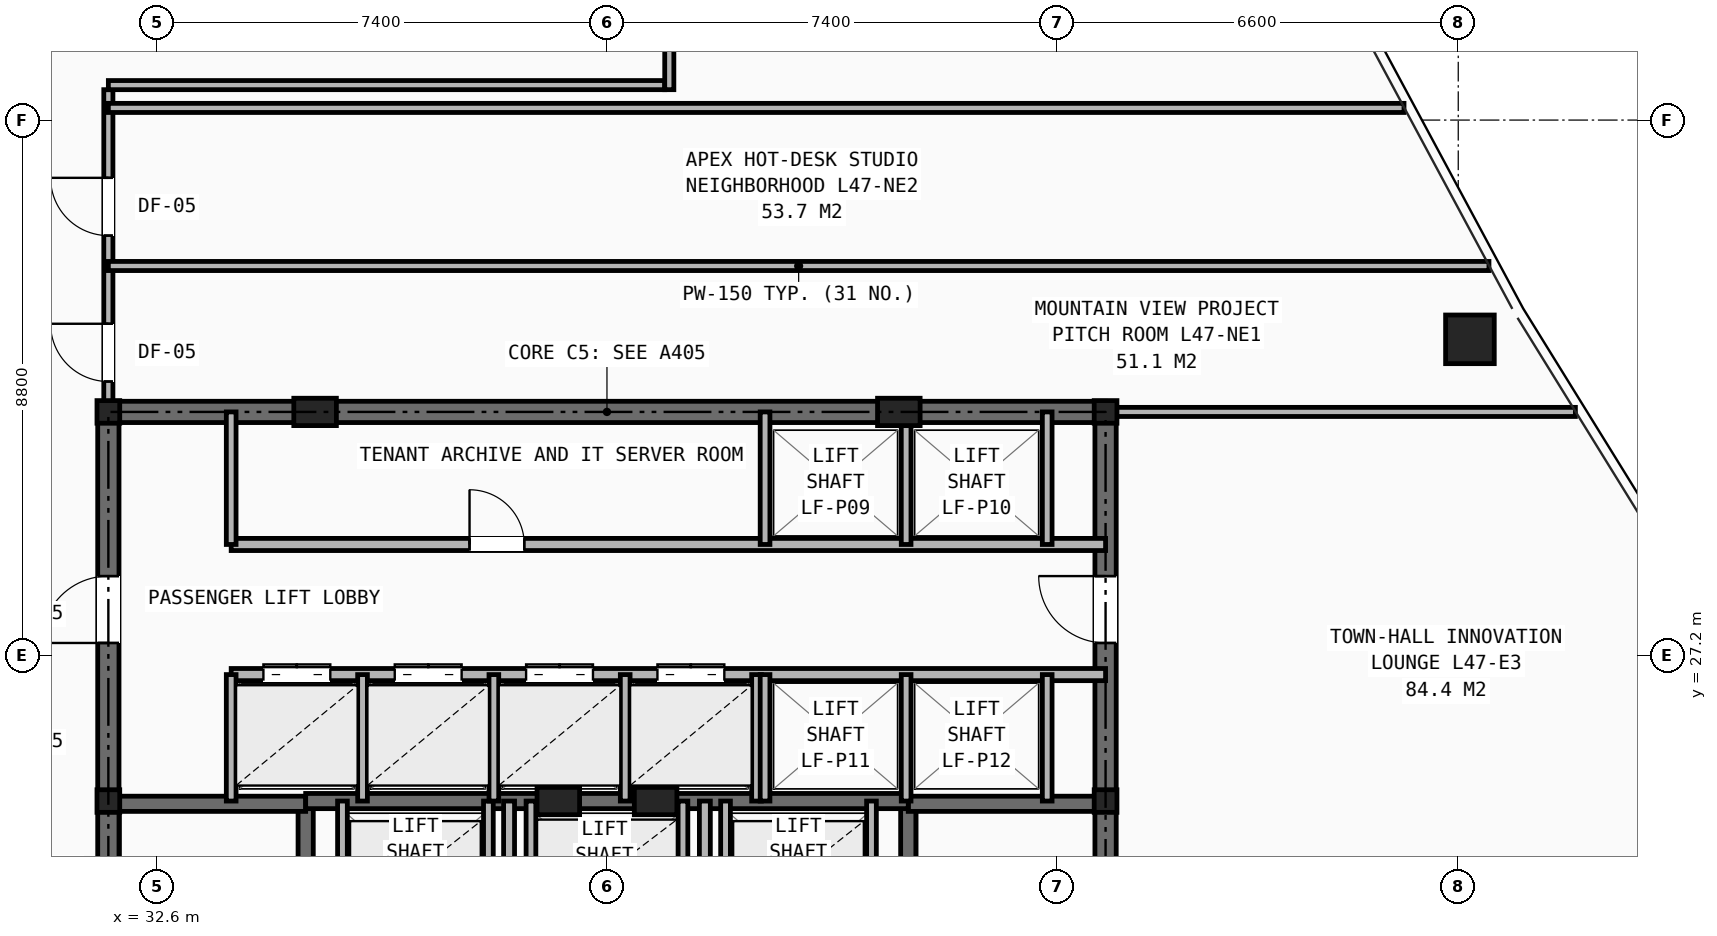
"""IFC4 building model, lengths in metres.
Left out: names, types, materials, properties, quantities, classifications, styles, units other than length and angle.
Written with IfcOpenShell. Run it as: python <this file> out.ifc"""

import sys

from ifc_helpers import new_model, si_unit, direction, frame, frame_2d, origin, origin_2d, place, context, subcontext, project, spatial, rectangle, hollow_rectangle, i_section, extrude, element, fill, save


model = new_model("IFC4")
c1 = context("Model", 3, precision=1e-05, world=origin(), true_north=direction((0.0, 1.0)))
c2 = subcontext(c1, "Body", "Model", "MODEL_VIEW")
j1 = project(units=[si_unit("LENGTHUNIT", "METRE"), si_unit("PLANEANGLEUNIT", "RADIAN")], contexts=[c1])
p1 = place(None, origin())
s1 = spatial("IfcSite", under=j1, at=p1, CompositionType="ELEMENT")
p2 = place(p1, origin())
s2 = spatial("IfcBuilding", under=s1, at=p2, CompositionType="ELEMENT")
p3 = place(p2, frame((0.0, 0.0, 165.45)))
s3 = spatial("IfcBuildingStorey", under=s2, at=p3, CompositionType="ELEMENT", Elevation=165.45)
for number, where, z_axis, x_axis in (
    (1, (31.8, 24.8, 0.0), (0.0, 0.0, 1.0), (1.0, 0.0, 0.0)),
    (2, (48.2, 24.8, 0.0), (0.0, 0.0, 1.0), (1.0, 0.0, 0.0)),
    (3, (31.8, 31.2, 0.0), (0.0, 0.0, 1.0), (1.0, 0.0, 0.0)),
    (4, (48.2, 31.2, 0.0), (0.0, 0.0, 1.0), (1.0, 0.0, 0.0)),
):
    element("IfcColumn", number, at=place(p3, frame(where, z_axis=z_axis, x_axis=x_axis)), inside=s3, PredefinedType="COLUMN", context=c2, shape_type="SweptSolid", body=[
        extrude(i_section(OverallWidth=0.374, OverallDepth=0.372, WebThickness=0.016, FlangeThickness=0.026, at=origin_2d()), origin(), (0.0, 0.0, 1.0), 3.45),
    ])
for number, where, z_axis, x_axis in (
    (5, (35.2, 31.2, 0.0), (0.0, 0.0, 1.0), (1.0, 0.0, 0.0)),
    (6, (44.8, 31.2, 0.0), (0.0, 0.0, 1.0), (1.0, 0.0, 0.0)),
    (7, (39.2, 24.8, 0.0), (0.0, 0.0, 1.0), (1.0, 0.0, 0.0)),
    (8, (40.8, 24.8, 0.0), (0.0, 0.0, 1.0), (1.0, 0.0, 0.0)),
):
    element("IfcColumn", number, at=place(p3, frame(where, z_axis=z_axis, x_axis=x_axis)), inside=s3, PredefinedType="PILASTER", context=c2, shape_type="SweptSolid", body=[
        extrude(rectangle(XDim=0.7, YDim=0.45, at=origin_2d()), origin(), (0.0, 0.0, 1.0), 3.45),
    ])
p4 = place(p3, frame((54.192, 32.394, 0.0), z_axis=(0.0, 0.0, 1.0), x_axis=(1.0, 0.0, 0.0)))
e9 = element("IfcColumn", 9, at=p4, inside=s3, PredefinedType="COLUMN", context=c2, shape_type="SweptSolid", body=[
    extrude(hollow_rectangle(XDim=0.8, YDim=0.8, WallThickness=0.055, at=origin_2d()), origin(), (0.0, 0.0, 1.0), 3.45),
])
p5 = place(p3, frame((31.8, 31.2, 0.0), z_axis=(0.0, 0.0, 1.0), x_axis=(1.0, 0.0, 0.0)))
e10 = element("IfcWall", 10, at=p5, inside=s3, PredefinedType="SHEAR", context=c2, shape_type="SweptSolid", body=[
    extrude(rectangle(XDim=16.4, YDim=0.35, at=frame_2d((8.2, 0.0))), origin(), (0.0, 0.0, 1.0), 3.21),
])
p6 = place(p3, frame((31.8, 16.4, 0.0), z_axis=(0.0, 0.0, 1.0), x_axis=(0.0, 1.0, 0.0)))
e11 = element("IfcWall", 11, at=p6, inside=s3, PredefinedType="SHEAR", context=c2, shape_type="SweptSolid", body=[
    extrude(rectangle(XDim=14.8, YDim=0.35, at=frame_2d((7.4, 0.0))), origin(), (0.0, 0.0, 1.0), 3.21),
])
p7 = place(p6, frame((11.0, 0.0, 0.0)))
e12 = element("IfcOpeningElement", 12, at=p7, cuts=e11, PredefinedType="OPENING", context=c2, shape_type="SweptSolid", body=[
    extrude(rectangle(XDim=1.1, YDim=2.15, at=frame_2d((0.55, 1.075))), frame((0.0, 0.185, 0.0), z_axis=(0.0, -1.0, 0.0), x_axis=(1.0, 0.0, 0.0)), (0.0, 0.0, 1.0), 0.37),
])
p8 = place(p3, frame((48.2, 16.4, 0.0), z_axis=(0.0, 0.0, 1.0), x_axis=(0.0, 1.0, 0.0)))
e13 = element("IfcWall", 13, at=p8, inside=s3, PredefinedType="SHEAR", context=c2, shape_type="SweptSolid", body=[
    extrude(rectangle(XDim=14.8, YDim=0.35, at=frame_2d((7.4, 0.0))), origin(), (0.0, 0.0, 1.0), 3.21),
])
p9 = place(p8, frame((11.0, 0.0, 0.0)))
e14 = element("IfcOpeningElement", 14, at=p9, cuts=e13, PredefinedType="OPENING", context=c2, shape_type="SweptSolid", body=[
    extrude(rectangle(XDim=1.1, YDim=2.15, at=frame_2d((0.55, 1.075))), frame((0.0, 0.185, 0.0), z_axis=(0.0, -1.0, 0.0), x_axis=(1.0, 0.0, 0.0)), (0.0, 0.0, 1.0), 0.37),
])
p10 = place(p3, frame((35.045, 16.4, 0.0), z_axis=(0.0, 0.0, 1.0), x_axis=(0.0, 1.0, 0.0)))
e15 = element("IfcWall", 15, at=p10, inside=s3, PredefinedType="SHEAR", context=c2, shape_type="SweptSolid", body=[
    extrude(rectangle(XDim=8.4, YDim=0.25, at=frame_2d((4.2, 0.0))), origin(), (0.0, 0.0, 1.0), 3.21),
])
p11 = place(p10, frame((0.45, 0.0, 0.0)))
e16 = element("IfcOpeningElement", 16, at=p11, cuts=e15, PredefinedType="OPENING", context=c2, shape_type="SweptSolid", body=[
    extrude(rectangle(XDim=0.95, YDim=2.1, at=frame_2d((0.475, 1.05))), frame((0.0, 0.135, 0.0), z_axis=(0.0, -1.0, 0.0), x_axis=(1.0, 0.0, 0.0)), (0.0, 0.0, 1.0), 0.27),
])
p12 = place(p3, frame((31.8, 24.755, 0.0), z_axis=(0.0, 0.0, 1.0), x_axis=(1.0, 0.0, 0.0)))
e17 = element("IfcWall", 17, at=p12, inside=s3, PredefinedType="SHEAR", context=c2, shape_type="SweptSolid", body=[
    extrude(rectangle(XDim=3.245, YDim=0.25, at=frame_2d((1.623, 0.0))), origin(), (0.0, 0.0, 1.0), 3.21),
])
p13 = place(p3, frame((44.955, 16.4, 0.0), z_axis=(0.0, 0.0, 1.0), x_axis=(0.0, 1.0, 0.0)))
e18 = element("IfcWall", 18, at=p13, inside=s3, PredefinedType="SHEAR", context=c2, shape_type="SweptSolid", body=[
    extrude(rectangle(XDim=8.4, YDim=0.25, at=frame_2d((4.2, 0.0))), origin(), (0.0, 0.0, 1.0), 3.21),
])
p14 = place(p13, frame((0.45, 0.0, 0.0)))
e19 = element("IfcOpeningElement", 19, at=p14, cuts=e18, PredefinedType="OPENING", context=c2, shape_type="SweptSolid", body=[
    extrude(rectangle(XDim=0.95, YDim=2.1, at=frame_2d((0.475, 1.05))), frame((0.0, 0.135, 0.0), z_axis=(0.0, -1.0, 0.0), x_axis=(1.0, 0.0, 0.0)), (0.0, 0.0, 1.0), 0.27),
])
p15 = place(p3, frame((44.955, 24.755, 0.0), z_axis=(0.0, 0.0, 1.0), x_axis=(1.0, 0.0, 0.0)))
e20 = element("IfcWall", 20, at=p15, inside=s3, PredefinedType="SHEAR", context=c2, shape_type="SweptSolid", body=[
    extrude(rectangle(XDim=3.245, YDim=0.25, at=frame_2d((1.623, 0.0))), origin(), (0.0, 0.0, 1.0), 3.21),
])
p16 = place(p3, frame((35.045, 24.8, 0.0), z_axis=(0.0, 0.0, 1.0), x_axis=(1.0, 0.0, 0.0)))
e21 = element("IfcWall", 21, at=p16, inside=s3, PredefinedType="SHEAR", context=c2, shape_type="SweptSolid", body=[
    extrude(rectangle(XDim=9.91, YDim=0.25, at=frame_2d((4.955, 0.0))), origin(), (0.0, 0.0, 1.0), 3.21),
])
p17 = place(p3, frame((38.39, 16.4, 0.0), z_axis=(0.0, 0.0, 1.0), x_axis=(0.0, 1.0, 0.0)))
e22 = element("IfcWall", 22, at=p17, inside=s3, PredefinedType="PARTITIONING", context=c2, shape_type="SweptSolid", body=[
    extrude(rectangle(XDim=8.4, YDim=0.18, at=frame_2d((4.2, 0.0))), origin(), (0.0, 0.0, 1.0), 2.665),
])
p18 = place(p17, frame((1.8, 0.0, 0.0)))
e23 = element("IfcOpeningElement", 23, at=p18, cuts=e22, PredefinedType="OPENING", context=c2, shape_type="SweptSolid", body=[
    extrude(rectangle(XDim=0.85, YDim=2.05, at=frame_2d((0.425, 1.025))), frame((0.0, 0.1, 0.0), z_axis=(0.0, -1.0, 0.0), x_axis=(1.0, 0.0, 0.0)), (0.0, 0.0, 1.0), 0.2),
])
p19 = place(p17, frame((4.35, 0.0, 0.0)))
e24 = element("IfcOpeningElement", 24, at=p19, cuts=e22, PredefinedType="OPENING", context=c2, shape_type="SweptSolid", body=[
    extrude(rectangle(XDim=0.95, YDim=2.1, at=frame_2d((0.475, 1.05))), frame((0.0, 0.1, 0.0), z_axis=(0.0, -1.0, 0.0), x_axis=(1.0, 0.0, 0.0)), (0.0, 0.0, 1.0), 0.2),
])
p20 = place(p3, frame((41.61, 16.4, 0.0), z_axis=(0.0, 0.0, 1.0), x_axis=(0.0, 1.0, 0.0)))
e25 = element("IfcWall", 25, at=p20, inside=s3, PredefinedType="PARTITIONING", context=c2, shape_type="SweptSolid", body=[
    extrude(rectangle(XDim=8.4, YDim=0.18, at=frame_2d((4.2, 0.0))), origin(), (0.0, 0.0, 1.0), 2.665),
])
p21 = place(p20, frame((1.8, 0.0, 0.0)))
e26 = element("IfcOpeningElement", 26, at=p21, cuts=e25, PredefinedType="OPENING", context=c2, shape_type="SweptSolid", body=[
    extrude(rectangle(XDim=0.85, YDim=2.05, at=frame_2d((0.425, 1.025))), frame((0.0, 0.1, 0.0), z_axis=(0.0, -1.0, 0.0), x_axis=(1.0, 0.0, 0.0)), (0.0, 0.0, 1.0), 0.2),
])
for number, where, z_axis, x_axis in (
    (27, (35.65, 22.48, 0.0), (0.0, 0.0, 1.0), (0.0, 1.0, 0.0)),
    (28, (38.05, 22.48, 0.0), (0.0, 0.0, 1.0), (0.0, 1.0, 0.0)),
    (29, (41.95, 22.48, 0.0), (0.0, 0.0, 1.0), (0.0, 1.0, 0.0)),
    (30, (44.35, 22.48, 0.0), (0.0, 0.0, 1.0), (0.0, 1.0, 0.0)),
    (31, (38.75, 22.48, 0.0), (0.0, 0.0, 1.0), (0.0, 1.0, 0.0)),
    (32, (41.25, 22.48, 0.0), (0.0, 0.0, 1.0), (0.0, 1.0, 0.0)),
):
    element("IfcWall", number, at=place(p3, frame(where, z_axis=z_axis, x_axis=x_axis)), inside=s3, PredefinedType="SOLIDWALL", context=c2, shape_type="SweptSolid", body=[
        extrude(rectangle(XDim=2.32, YDim=0.16, at=frame_2d((1.16, 0.0))), origin(), (0.0, 0.0, 1.0), 3.21),
    ])
p22 = place(p3, frame((33.82, 29.02, 0.0), z_axis=(0.0, 0.0, 1.0), x_axis=(1.0, 0.0, 0.0)))
e33 = element("IfcWall", 33, at=p22, inside=s3, PredefinedType="SOLIDWALL", context=c2, shape_type="SweptSolid", body=[
    extrude(rectangle(XDim=14.38, YDim=0.2, at=frame_2d((7.19, 0.0))), origin(), (0.0, 0.0, 1.0), 2.665),
])
p23 = place(p22, frame((3.92, 0.0, 0.0)))
e34 = element("IfcOpeningElement", 34, at=p23, cuts=e33, PredefinedType="OPENING", context=c2, shape_type="SweptSolid", body=[
    extrude(rectangle(XDim=0.9, YDim=2.1, at=frame_2d((0.45, 1.05))), frame((0.0, 0.11, 0.0), z_axis=(0.0, -1.0, 0.0), x_axis=(1.0, 0.0, 0.0)), (0.0, 0.0, 1.0), 0.22),
])
p24 = place(p3, frame((33.82, 26.88, 0.0), z_axis=(0.0, 0.0, 1.0), x_axis=(1.0, 0.0, 0.0)))
e35 = element("IfcWall", 35, at=p24, inside=s3, PredefinedType="SOLIDWALL", context=c2, shape_type="SweptSolid", body=[
    extrude(rectangle(XDim=14.38, YDim=0.2, at=frame_2d((7.19, 0.0))), origin(), (0.0, 0.0, 1.0), 2.665),
])
p25 = place(p24, frame((0.53, 0.0, 0.0)))
e36 = element("IfcOpeningElement", 36, at=p25, cuts=e35, PredefinedType="OPENING", context=c2, shape_type="SweptSolid", body=[
    extrude(rectangle(XDim=1.1, YDim=2.15, at=frame_2d((0.55, 1.075))), frame((0.0, 0.11, 0.0), z_axis=(0.0, -1.0, 0.0), x_axis=(1.0, 0.0, 0.0)), (0.0, 0.0, 1.0), 0.22),
])
p26 = place(p24, frame((2.69, 0.0, 0.0)))
e37 = element("IfcOpeningElement", 37, at=p26, cuts=e35, PredefinedType="OPENING", context=c2, shape_type="SweptSolid", body=[
    extrude(rectangle(XDim=1.1, YDim=2.15, at=frame_2d((0.55, 1.075))), frame((0.0, 0.11, 0.0), z_axis=(0.0, -1.0, 0.0), x_axis=(1.0, 0.0, 0.0)), (0.0, 0.0, 1.0), 0.22),
])
p27 = place(p24, frame((4.85, 0.0, 0.0)))
e38 = element("IfcOpeningElement", 38, at=p27, cuts=e35, PredefinedType="OPENING", context=c2, shape_type="SweptSolid", body=[
    extrude(rectangle(XDim=1.1, YDim=2.15, at=frame_2d((0.55, 1.075))), frame((0.0, 0.11, 0.0), z_axis=(0.0, -1.0, 0.0), x_axis=(1.0, 0.0, 0.0)), (0.0, 0.0, 1.0), 0.22),
])
p28 = place(p24, frame((7.01, 0.0, 0.0)))
e39 = element("IfcOpeningElement", 39, at=p28, cuts=e35, PredefinedType="OPENING", context=c2, shape_type="SweptSolid", body=[
    extrude(rectangle(XDim=1.1, YDim=2.15, at=frame_2d((0.55, 1.075))), frame((0.0, 0.11, 0.0), z_axis=(0.0, -1.0, 0.0), x_axis=(1.0, 0.0, 0.0)), (0.0, 0.0, 1.0), 0.22),
])
p29 = place(p3, frame((33.82, 29.02, 0.0), z_axis=(0.0, 0.0, 1.0), x_axis=(0.0, 1.0, 0.0)))
e40 = element("IfcWall", 40, at=p29, inside=s3, PredefinedType="SOLIDWALL", context=c2, shape_type="SweptSolid", body=[
    extrude(rectangle(XDim=2.18, YDim=0.16, at=frame_2d((1.09, 0.0))), origin(), (0.0, 0.0, 1.0), 2.665),
])
for number, where, z_axis, x_axis in (
    (41, (33.82, 24.8, 0.0), (0.0, 0.0, 1.0), (0.0, 1.0, 0.0)),
    (42, (35.98, 24.8, 0.0), (0.0, 0.0, 1.0), (0.0, 1.0, 0.0)),
    (43, (38.14, 24.8, 0.0), (0.0, 0.0, 1.0), (0.0, 1.0, 0.0)),
    (44, (40.3, 24.8, 0.0), (0.0, 0.0, 1.0), (0.0, 1.0, 0.0)),
    (45, (42.46, 24.8, 0.0), (0.0, 0.0, 1.0), (0.0, 1.0, 0.0)),
):
    element("IfcWall", number, at=place(p3, frame(where, z_axis=z_axis, x_axis=x_axis)), inside=s3, PredefinedType="SOLIDWALL", context=c2, shape_type="SweptSolid", body=[
        extrude(rectangle(XDim=2.08, YDim=0.16, at=frame_2d((1.04, 0.0))), origin(), (0.0, 0.0, 1.0), 3.21),
    ])
for number, where, z_axis, x_axis in (
    (46, (42.6, 29.02, 0.0), (0.0, 0.0, 1.0), (0.0, 1.0, 0.0)),
    (47, (44.92, 29.02, 0.0), (0.0, 0.0, 1.0), (0.0, 1.0, 0.0)),
    (48, (47.24, 29.02, 0.0), (0.0, 0.0, 1.0), (0.0, 1.0, 0.0)),
):
    element("IfcWall", number, at=place(p3, frame(where, z_axis=z_axis, x_axis=x_axis)), inside=s3, PredefinedType="SOLIDWALL", context=c2, shape_type="SweptSolid", body=[
        extrude(rectangle(XDim=2.18, YDim=0.16, at=frame_2d((1.09, 0.0))), origin(), (0.0, 0.0, 1.0), 2.665),
    ])
for number, where, z_axis, x_axis in (
    (49, (42.6, 24.8, 0.0), (0.0, 0.0, 1.0), (0.0, 1.0, 0.0)),
    (50, (44.92, 24.8, 0.0), (0.0, 0.0, 1.0), (0.0, 1.0, 0.0)),
    (51, (47.24, 24.8, 0.0), (0.0, 0.0, 1.0), (0.0, 1.0, 0.0)),
):
    element("IfcWall", number, at=place(p3, frame(where, z_axis=z_axis, x_axis=x_axis)), inside=s3, PredefinedType="SOLIDWALL", context=c2, shape_type="SweptSolid", body=[
        extrude(rectangle(XDim=2.08, YDim=0.16, at=frame_2d((1.04, 0.0))), origin(), (0.0, 0.0, 1.0), 3.21),
    ])
p30 = place(p3, frame((31.8, 31.2, 0.0), z_axis=(0.0, 0.0, 1.0), x_axis=(0.0, 1.0, 0.0)))
e52 = element("IfcWall", 52, at=p30, inside=s3, PredefinedType="PARTITIONING", context=c2, shape_type="SweptSolid", body=[
    extrude(rectangle(XDim=5.3, YDim=0.15, at=frame_2d((2.65, 0.0))), origin(), (0.0, 0.0, 1.0), 2.252),
])
p31 = place(p30, frame((0.5, 0.0, 0.0)))
e53 = element("IfcOpeningElement", 53, at=p31, cuts=e52, PredefinedType="OPENING", context=c2, shape_type="SweptSolid", body=[
    extrude(rectangle(XDim=0.95, YDim=2.1, at=frame_2d((0.475, 1.05))), frame((0.0, 0.085, 0.0), z_axis=(0.0, -1.0, 0.0), x_axis=(1.0, 0.0, 0.0)), (0.0, 0.0, 1.0), 0.17),
])
p32 = place(p30, frame((2.9, 0.0, 0.0)))
e54 = element("IfcOpeningElement", 54, at=p32, cuts=e52, PredefinedType="OPENING", context=c2, shape_type="SweptSolid", body=[
    extrude(rectangle(XDim=0.95, YDim=2.1, at=frame_2d((0.475, 1.05))), frame((0.0, 0.085, 0.0), z_axis=(0.0, -1.0, 0.0), x_axis=(1.0, 0.0, 0.0)), (0.0, 0.0, 1.0), 0.17),
])
p33 = place(p3, frame((48.2, 31.2, 0.0), z_axis=(0.0, 0.0, 1.0), x_axis=(1.0, 0.0, 0.0)))
e55 = element("IfcWall", 55, at=p33, inside=s3, PredefinedType="PARTITIONING", context=c2, shape_type="SweptSolid", body=[
    extrude(rectangle(XDim=7.727, YDim=0.15, at=frame_2d((3.863, 0.0))), origin(), (0.0, 0.0, 1.0), 2.252),
])
p34 = place(p3, frame((31.8, 33.6, 0.0), z_axis=(0.0, 0.0, 1.0), x_axis=(1.0, 0.0, 0.0)))
e56 = element("IfcWall", 56, at=p34, inside=s3, PredefinedType="PARTITIONING", context=c2, shape_type="SweptSolid", body=[
    extrude(rectangle(XDim=22.705, YDim=0.15, at=frame_2d((11.353, 0.0))), origin(), (0.0, 0.0, 1.0), 2.589),
])
p35 = place(p3, frame((31.8, 36.2, 0.0), z_axis=(0.0, 0.0, 1.0), x_axis=(1.0, 0.0, 0.0)))
e57 = element("IfcWall", 57, at=p35, inside=s3, PredefinedType="PARTITIONING", context=c2, shape_type="SweptSolid", body=[
    extrude(rectangle(XDim=21.308, YDim=0.15, at=frame_2d((10.654, 0.0))), origin(), (0.0, 0.0, 1.0), 2.589),
])
p36 = place(p3, frame((31.8, 36.575, 0.0), z_axis=(0.0, 0.0, 1.0), x_axis=(1.0, 0.0, 0.0)))
e58 = element("IfcWall", 58, at=p36, inside=s3, PredefinedType="PARTITIONING", context=c2, shape_type="SweptSolid", body=[
    extrude(rectangle(XDim=9.15, YDim=0.15, at=frame_2d((4.575, 0.0))), origin(), (0.0, 0.0, 1.0), 3.21),
])
p37 = place(p3, frame((41.025, 36.5, 0.0), z_axis=(0.0, 0.0, 1.0), x_axis=(0.0, 1.0, 0.0)))
e59 = element("IfcWall", 59, at=p37, inside=s3, PredefinedType="PARTITIONING", context=c2, shape_type="SweptSolid", body=[
    extrude(rectangle(XDim=1.95, YDim=0.15, at=frame_2d((0.975, 0.0))), origin(), (0.0, 0.0, 1.0), 3.21),
])
p38 = place(p7, origin())
e60 = element("IfcDoor", 60, at=p38, inside=s3, OperationType="SINGLE_SWING_LEFT", PredefinedType="DOOR", context=c2, shape_type="SweptSolid", body=[
    extrude(rectangle(XDim=1.1, YDim=2.15, at=frame_2d((0.55, 1.075))), frame((0.0, 0.025, 0.0), z_axis=(0.0, -1.0, 0.0), x_axis=(1.0, 0.0, 0.0)), (0.0, 0.0, 1.0), 0.05),
])
fill(e12, e60)
p39 = place(p9, origin())
e61 = element("IfcDoor", 61, at=p39, inside=s3, OperationType="SINGLE_SWING_RIGHT", PredefinedType="DOOR", context=c2, shape_type="SweptSolid", body=[
    extrude(rectangle(XDim=1.1, YDim=2.15, at=frame_2d((0.55, 1.075))), frame((0.0, 0.025, 0.0), z_axis=(0.0, -1.0, 0.0), x_axis=(1.0, 0.0, 0.0)), (0.0, 0.0, 1.0), 0.05),
])
fill(e14, e61)
p40 = place(p23, origin())
e62 = element("IfcDoor", 62, at=p40, inside=s3, OperationType="SINGLE_SWING_LEFT", PredefinedType="DOOR", context=c2, shape_type="SweptSolid", body=[
    extrude(rectangle(XDim=0.9, YDim=2.1, at=frame_2d((0.45, 1.05))), frame((0.0, 0.025, 0.0), z_axis=(0.0, -1.0, 0.0), x_axis=(1.0, 0.0, 0.0)), (0.0, 0.0, 1.0), 0.05),
])
fill(e34, e62)
p41 = place(p25, origin())
e63 = element("IfcDoor", 63, at=p41, inside=s3, OperationType="DOUBLE_DOOR_SLIDING", PredefinedType="DOOR", context=c2, shape_type="SweptSolid", body=[
    extrude(rectangle(XDim=1.1, YDim=2.15, at=frame_2d((0.55, 1.075))), frame((0.0, 0.025, 0.0), z_axis=(0.0, -1.0, 0.0), x_axis=(1.0, 0.0, 0.0)), (0.0, 0.0, 1.0), 0.05),
])
fill(e36, e63)
p42 = place(p26, origin())
e64 = element("IfcDoor", 64, at=p42, inside=s3, OperationType="DOUBLE_DOOR_SLIDING", PredefinedType="DOOR", context=c2, shape_type="SweptSolid", body=[
    extrude(rectangle(XDim=1.1, YDim=2.15, at=frame_2d((0.55, 1.075))), frame((0.0, 0.025, 0.0), z_axis=(0.0, -1.0, 0.0), x_axis=(1.0, 0.0, 0.0)), (0.0, 0.0, 1.0), 0.05),
])
fill(e37, e64)
p43 = place(p27, origin())
e65 = element("IfcDoor", 65, at=p43, inside=s3, OperationType="DOUBLE_DOOR_SLIDING", PredefinedType="DOOR", context=c2, shape_type="SweptSolid", body=[
    extrude(rectangle(XDim=1.1, YDim=2.15, at=frame_2d((0.55, 1.075))), frame((0.0, 0.025, 0.0), z_axis=(0.0, -1.0, 0.0), x_axis=(1.0, 0.0, 0.0)), (0.0, 0.0, 1.0), 0.05),
])
fill(e38, e65)
p44 = place(p28, origin())
e66 = element("IfcDoor", 66, at=p44, inside=s3, OperationType="DOUBLE_DOOR_SLIDING", PredefinedType="DOOR", context=c2, shape_type="SweptSolid", body=[
    extrude(rectangle(XDim=1.1, YDim=2.15, at=frame_2d((0.55, 1.075))), frame((0.0, 0.025, 0.0), z_axis=(0.0, -1.0, 0.0), x_axis=(1.0, 0.0, 0.0)), (0.0, 0.0, 1.0), 0.05),
])
fill(e39, e66)
p45 = place(p31, origin())
e67 = element("IfcDoor", 67, at=p45, inside=s3, OperationType="SINGLE_SWING_RIGHT", PredefinedType="DOOR", context=c2, shape_type="SweptSolid", body=[
    extrude(rectangle(XDim=0.95, YDim=2.1, at=frame_2d((0.475, 1.05))), frame((0.0, 0.025, 0.0), z_axis=(0.0, -1.0, 0.0), x_axis=(1.0, 0.0, 0.0)), (0.0, 0.0, 1.0), 0.05),
])
fill(e53, e67)
p46 = place(p32, origin())
e68 = element("IfcDoor", 68, at=p46, inside=s3, OperationType="SINGLE_SWING_RIGHT", PredefinedType="DOOR", context=c2, shape_type="SweptSolid", body=[
    extrude(rectangle(XDim=0.95, YDim=2.1, at=frame_2d((0.475, 1.05))), frame((0.0, 0.025, 0.0), z_axis=(0.0, -1.0, 0.0), x_axis=(1.0, 0.0, 0.0)), (0.0, 0.0, 1.0), 0.05),
])
fill(e54, e68)
save(model, sys.argv[1])
